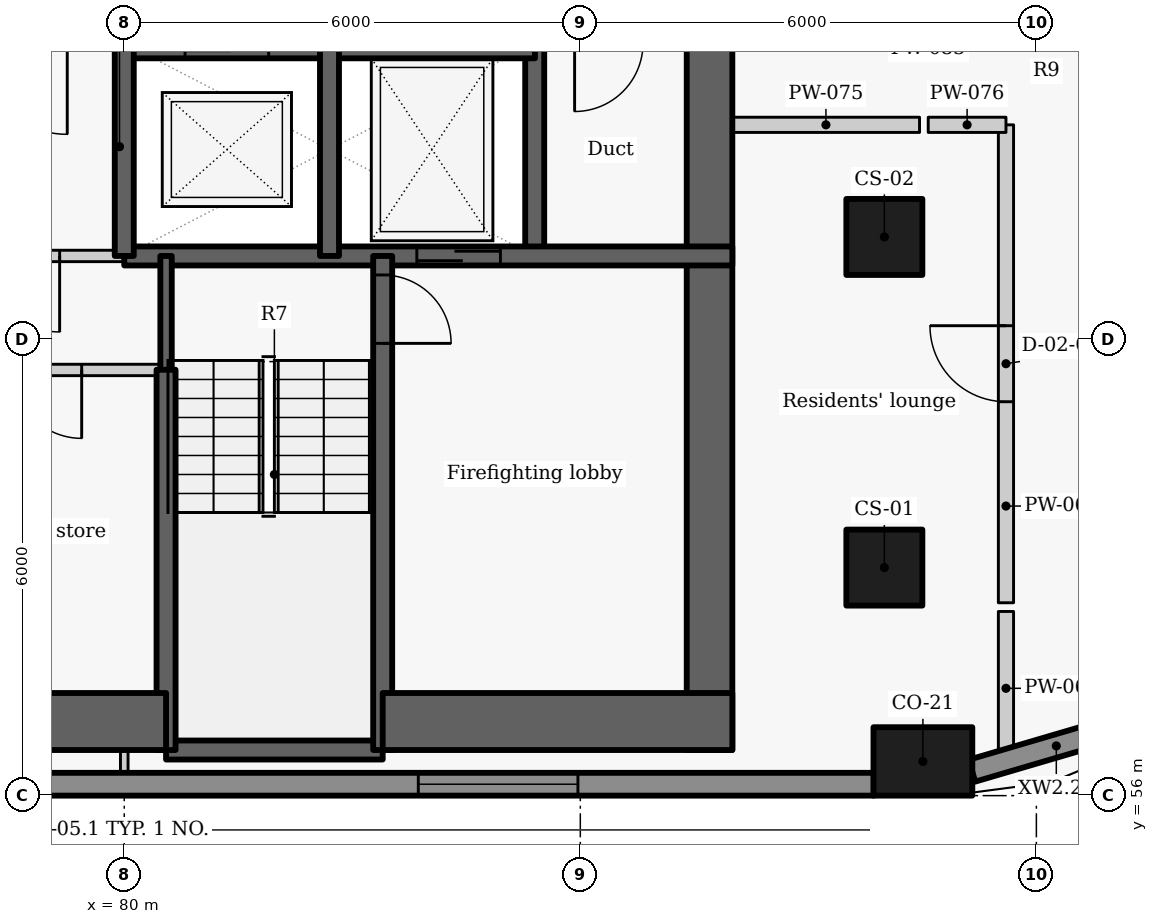
"""IFC4 building model, lengths in metres.
Left out: names, types, materials, properties, quantities, classifications, styles, units other than length and angle.
Written with IfcOpenShell. Run it as: python <this file> out.ifc"""

import sys

from ifc_helpers import new_model, si_unit, direction, frame, frame_2d, origin, origin_2d, place, context, subcontext, project, spatial, rectangle, extrude, element, fill, save


model = new_model("IFC4")
c1 = context("Model", 3, precision=1e-05, world=origin(), true_north=direction((0.0, 1.0)))
c2 = subcontext(c1, "Body", "Model", "MODEL_VIEW")
j1 = project(units=[si_unit("LENGTHUNIT", "METRE"), si_unit("PLANEANGLEUNIT", "RADIAN")], contexts=[c1])
p1 = place(None, origin())
s1 = spatial("IfcSite", under=j1, at=p1, CompositionType="ELEMENT")
p2 = place(p1, origin())
s2 = spatial("IfcBuilding", under=s1, at=p2, CompositionType="ELEMENT")
p3 = place(p2, frame((0.0, 0.0, 130.5)))
s3 = spatial("IfcBuildingStorey", under=s2, at=p3, CompositionType="ELEMENT", Elevation=130.5)
p4 = place(p3, frame((90.507, 56.45, 0.0), z_axis=(0.0, 0.0, 1.0), x_axis=(1.0, 0.0, 0.0)))
e1 = element("IfcColumn", 1, at=p4, inside=s3, PredefinedType="COLUMN", context=c2, shape_type="SweptSolid", body=[
    extrude(rectangle(XDim=1.3, YDim=0.9, at=origin_2d()), origin(), (0.0, 0.0, 1.0), 3.3),
])
for number, where, z_axis, x_axis in (
    (2, (90.0, 59.0, 0.0), (0.0, 0.0, 1.0), (0.0, 1.0, 0.0)),
    (3, (90.0, 63.35, 0.0), (0.0, 0.0, 1.0), (0.0, 1.0, 0.0)),
):
    element("IfcColumn", number, at=place(p3, frame(where, z_axis=z_axis, x_axis=x_axis)), inside=s3, PredefinedType="COLUMN", context=c2, shape_type="SweptSolid", body=[
        extrude(rectangle(XDim=1.0, YDim=1.0, at=origin_2d()), origin(), (0.0, 0.0, 1.0), 3.3),
    ])
p5 = place(p3, frame((69.821, 56.15, 0.0), z_axis=(0.0, 0.0, 1.0), x_axis=(1.0, 0.0, 0.0)))
e4 = element("IfcWall", 4, at=p5, inside=s3, PredefinedType="SOLIDWALL", context=c2, shape_type="SweptSolid", body=[
    extrude(rectangle(XDim=20.04, YDim=0.3, at=frame_2d((10.02, 0.0))), origin(), (0.0, 0.0, 1.0), 2.425),
])
p6 = place(p5, frame((4.051, 0.0, 0.9)))
e5 = element("IfcOpeningElement", 5, at=p6, cuts=e4, PredefinedType="OPENING", context=c2, shape_type="SweptSolid", body=[
    extrude(rectangle(XDim=2.1, YDim=1.1, at=frame_2d((1.05, 0.55))), frame((0.0, 0.16, 0.0), z_axis=(0.0, -1.0, 0.0), x_axis=(1.0, 0.0, 0.0)), (0.0, 0.0, 1.0), 0.32),
])
p7 = place(p5, frame((14.047, 0.0, 0.9)))
e6 = element("IfcOpeningElement", 6, at=p7, cuts=e4, PredefinedType="OPENING", context=c2, shape_type="SweptSolid", body=[
    extrude(rectangle(XDim=2.1, YDim=1.1, at=frame_2d((1.05, 0.55))), frame((0.0, 0.16, 0.0), z_axis=(0.0, -1.0, 0.0), x_axis=(1.0, 0.0, 0.0)), (0.0, 0.0, 1.0), 0.32),
])
p8 = place(p3, frame((91.153, 56.328, 0.0), z_axis=(0.0, 0.0, 1.0), x_axis=(0.959473072336, 0.281800325517, 0.0)))
e7 = element("IfcWall", 7, at=p8, inside=s3, PredefinedType="SOLIDWALL", context=c2, shape_type="SweptSolid", body=[
    extrude(rectangle(XDim=2.312, YDim=0.3, at=frame_2d((1.156, 0.0))), origin(), (0.0, 0.0, 1.0), 2.425),
])
p9 = place(p3, frame((85.4, 63.1, -0.275), z_axis=(0.0, 0.0, 1.0), x_axis=(0.0, 1.0, 0.0)))
e8 = element("IfcWall", 8, at=p9, inside=s3, PredefinedType="SHEAR", context=c2, shape_type="SweptSolid", body=[
    extrude(rectangle(XDim=2.8, YDim=0.25, at=frame_2d((1.4, 0.0))), origin(), (0.0, 0.0, 1.0), 3.3),
])
p10 = place(p3, frame((87.7, 72.2, -0.275), z_axis=(0.0, 0.0, 1.0), x_axis=(0.0, -1.0, 0.0)))
e9 = element("IfcWall", 9, at=p10, inside=s3, PredefinedType="SHEAR", context=c2, shape_type="SweptSolid", body=[
    extrude(rectangle(XDim=15.6, YDim=0.6, at=frame_2d((7.8, 0.0))), origin(), (0.0, 0.0, 1.0), 3.3),
])
p11 = place(p10, frame((3.852, 0.0, 0.275)))
e10 = element("IfcOpeningElement", 10, at=p11, cuts=e9, PredefinedType="OPENING", context=c2, shape_type="SweptSolid", body=[
    extrude(rectangle(XDim=1.5, YDim=2.1, at=frame_2d((0.75, 1.05))), frame((0.0, 0.31, 0.0), z_axis=(0.0, -1.0, 0.0), x_axis=(1.0, 0.0, 0.0)), (0.0, 0.0, 1.0), 0.62),
])
p12 = place(p3, frame((79.997, 65.9, -0.275), z_axis=(0.0, 0.0, 1.0), x_axis=(1.0, 0.0, 0.0)))
e11 = element("IfcWall", 11, at=p12, inside=s3, PredefinedType="SHEAR", context=c2, shape_type="SweptSolid", body=[
    extrude(rectangle(XDim=5.406, YDim=0.4, at=frame_2d((2.703, 0.0))), origin(), (0.0, 0.0, 1.0), 3.3),
])
p13 = place(p12, frame((0.803, 0.0, 0.275)))
e12 = element("IfcOpeningElement", 12, at=p13, cuts=e11, PredefinedType="OPENING", context=c2, shape_type="SweptSolid", body=[
    extrude(rectangle(XDim=1.1, YDim=2.1, at=frame_2d((0.55, 1.05))), frame((0.0, 0.21, 0.0), z_axis=(0.0, -1.0, 0.0), x_axis=(1.0, 0.0, 0.0)), (0.0, 0.0, 1.0), 0.42),
])
p14 = place(p3, frame((80.0, 63.1, -0.275), z_axis=(0.0, 0.0, 1.0), x_axis=(1.0, 0.0, 0.0)))
e13 = element("IfcWall", 13, at=p14, inside=s3, PredefinedType="SHEAR", context=c2, shape_type="SweptSolid", body=[
    extrude(rectangle(XDim=8.0, YDim=0.25, at=frame_2d((4.0, 0.0))), origin(), (0.0, 0.0, 1.0), 3.3),
])
p15 = place(p14, frame((3.849, 0.0, 0.275)))
e14 = element("IfcOpeningElement", 14, at=p15, cuts=e13, PredefinedType="OPENING", context=c2, shape_type="SweptSolid", body=[
    extrude(rectangle(XDim=1.1, YDim=2.1, at=frame_2d((0.55, 1.05))), frame((0.0, 0.135, 0.0), z_axis=(0.0, -1.0, 0.0), x_axis=(1.0, 0.0, 0.0)), (0.0, 0.0, 1.0), 0.27),
])
p16 = place(p3, frame((80.0, 63.1, -0.275), z_axis=(0.0, 0.0, 1.0), x_axis=(0.0, 1.0, 0.0)))
e15 = element("IfcWall", 15, at=p16, inside=s3, PredefinedType="SHEAR", context=c2, shape_type="SweptSolid", body=[
    extrude(rectangle(XDim=2.8, YDim=0.25, at=frame_2d((1.4, 0.0))), origin(), (0.0, 0.0, 1.0), 3.3),
])
p17 = place(p3, frame((80.0, 63.1, 0.0), z_axis=(0.0, 0.0, 1.0), x_axis=(-1.0, 0.0, 0.0)))
e16 = element("IfcWall", 16, at=p17, inside=s3, PredefinedType="PARTITIONING", context=c2, shape_type="SweptSolid", body=[
    extrude(rectangle(XDim=2.7, YDim=0.15, at=frame_2d((1.35, 0.0))), origin(), (0.0, 0.0, 1.0), 3.025),
])
p18 = place(p17, frame((0.85, 0.0, 0.0)))
e17 = element("IfcOpeningElement", 17, at=p18, cuts=e16, PredefinedType="OPENING", context=c2, shape_type="SweptSolid", body=[
    extrude(rectangle(XDim=1.0, YDim=2.1, at=frame_2d((0.5, 1.05))), frame((0.0, 0.085, 0.0), z_axis=(0.0, -1.0, 0.0), x_axis=(1.0, 0.0, 0.0)), (0.0, 0.0, 1.0), 0.17),
])
p19 = place(p3, frame((82.7, 63.1, -0.275), z_axis=(0.0, 0.0, 1.0), x_axis=(0.0, 1.0, 0.0)))
e18 = element("IfcWall", 18, at=p19, inside=s3, PredefinedType="SHEAR", context=c2, shape_type="SweptSolid", body=[
    extrude(rectangle(XDim=2.8, YDim=0.25, at=frame_2d((1.4, 0.0))), origin(), (0.0, 0.0, 1.0), 3.3),
])
p20 = place(p3, frame((80.55, 56.6, -0.275), z_axis=(0.0, 0.0, 1.0), x_axis=(1.0, 0.0, 0.0)))
e19 = element("IfcWall", 19, at=p20, inside=s3, PredefinedType="SHEAR", context=c2, shape_type="SweptSolid", body=[
    extrude(rectangle(XDim=2.85, YDim=0.25, at=frame_2d((1.425, 0.0))), origin(), (0.0, 0.0, 1.0), 3.3),
])
p21 = place(p3, frame((83.4, 63.1, -0.275), z_axis=(0.0, 0.0, 1.0), x_axis=(0.0, -1.0, 0.0)))
e20 = element("IfcWall", 20, at=p21, inside=s3, PredefinedType="SHEAR", context=c2, shape_type="SweptSolid", body=[
    extrude(rectangle(XDim=6.5, YDim=0.25, at=frame_2d((3.25, 0.0))), origin(), (0.0, 0.0, 1.0), 3.3),
])
p22 = place(p21, frame((0.25, 0.0, 0.275)))
e21 = element("IfcOpeningElement", 21, at=p22, cuts=e20, PredefinedType="OPENING", context=c2, shape_type="SweptSolid", body=[
    extrude(rectangle(XDim=0.9, YDim=2.1, at=frame_2d((0.45, 1.05))), frame((0.0, 0.135, 0.0), z_axis=(0.0, -1.0, 0.0), x_axis=(1.0, 0.0, 0.0)), (0.0, 0.0, 1.0), 0.27),
])
p23 = place(p3, frame((80.55, 61.597, -0.275), z_axis=(0.0, 0.0, 1.0), x_axis=(0.0, 1.0, 0.0)))
e22 = element("IfcWall", 22, at=p23, inside=s3, PredefinedType="SHEAR", context=c2, shape_type="SweptSolid", body=[
    extrude(rectangle(XDim=1.503, YDim=0.15, at=frame_2d((0.751, 0.0))), origin(), (0.0, 0.0, 1.0), 3.3),
])
p24 = place(p3, frame((80.55, 56.6, -0.275), z_axis=(0.0, 0.0, 1.0), x_axis=(0.0, 1.0, 0.0)))
e23 = element("IfcWall", 23, at=p24, inside=s3, PredefinedType="SHEAR", context=c2, shape_type="SweptSolid", body=[
    extrude(rectangle(XDim=5.003, YDim=0.25, at=frame_2d((2.501, 0.0))), origin(), (0.0, 0.0, 1.0), 3.3),
])
p25 = place(p3, frame((75.35, 56.975, -0.275), z_axis=(0.0, 0.0, 1.0), x_axis=(1.0, 0.0, 0.0)))
e24 = element("IfcWall", 24, at=p25, inside=s3, PredefinedType="SHEAR", context=c2, shape_type="SweptSolid", body=[
    extrude(rectangle(XDim=5.2, YDim=0.75, at=frame_2d((2.6, 0.0))), origin(), (0.0, 0.0, 1.0), 3.3),
])
p26 = place(p3, frame((83.4, 56.975, -0.275), z_axis=(0.0, 0.0, 1.0), x_axis=(1.0, 0.0, 0.0)))
e25 = element("IfcWall", 25, at=p26, inside=s3, PredefinedType="SHEAR", context=c2, shape_type="SweptSolid", body=[
    extrude(rectangle(XDim=4.6, YDim=0.75, at=frame_2d((2.3, 0.0))), origin(), (0.0, 0.0, 1.0), 3.3),
])
p27 = place(p3, frame((80.55, 61.6, 0.0), z_axis=(0.0, 0.0, 1.0), x_axis=(-1.0, 0.0, 0.0)))
e26 = element("IfcWall", 26, at=p27, inside=s3, PredefinedType="PARTITIONING", context=c2, shape_type="SweptSolid", body=[
    extrude(rectangle(XDim=5.2, YDim=0.15, at=frame_2d((2.6, 0.0))), origin(), (0.0, 0.0, 1.0), 3.025),
])
p28 = place(p27, frame((3.71, 0.0, 0.0)))
e27 = element("IfcOpeningElement", 27, at=p28, cuts=e26, PredefinedType="OPENING", context=c2, shape_type="SweptSolid", body=[
    extrude(rectangle(XDim=0.9, YDim=2.1, at=frame_2d((0.45, 1.05))), frame((0.0, 0.085, 0.0), z_axis=(0.0, -1.0, 0.0), x_axis=(1.0, 0.0, 0.0)), (0.0, 0.0, 1.0), 0.17),
])
p29 = place(p27, frame((1.11, 0.0, 0.0)))
e28 = element("IfcOpeningElement", 28, at=p29, cuts=e26, PredefinedType="OPENING", context=c2, shape_type="SweptSolid", body=[
    extrude(rectangle(XDim=0.9, YDim=2.1, at=frame_2d((0.45, 1.05))), frame((0.0, 0.085, 0.0), z_axis=(0.0, -1.0, 0.0), x_axis=(1.0, 0.0, 0.0)), (0.0, 0.0, 1.0), 0.17),
])
p30 = place(p3, frame((91.6, 56.401, 0.0), z_axis=(0.0, 0.0, 1.0), x_axis=(0.0, 1.0, 0.0)))
e29 = element("IfcWall", 29, at=p30, inside=s3, PredefinedType="PARTITIONING", context=c2, shape_type="SweptSolid", body=[
    extrude(rectangle(XDim=2.022, YDim=0.2, at=frame_2d((1.011, 0.0))), origin(), (0.0, 0.0, 1.0), 2.405),
])
p31 = place(p3, frame((91.6, 58.537, 0.0), z_axis=(0.0, 0.0, 1.0), x_axis=(0.0, 1.0, 0.0)))
e30 = element("IfcWall", 30, at=p31, inside=s3, PredefinedType="PARTITIONING", context=c2, shape_type="SweptSolid", body=[
    extrude(rectangle(XDim=6.288, YDim=0.2, at=frame_2d((3.144, 0.0))), origin(), (0.0, 0.0, 1.0), 3.025),
])
p32 = place(p31, frame((2.645, 0.0, 0.0)))
e31 = element("IfcOpeningElement", 31, at=p32, cuts=e30, PredefinedType="OPENING", context=c2, shape_type="SweptSolid", body=[
    extrude(rectangle(XDim=1.0, YDim=2.1, at=frame_2d((0.5, 1.05))), frame((0.0, 0.11, 0.0), z_axis=(0.0, -1.0, 0.0), x_axis=(1.0, 0.0, 0.0)), (0.0, 0.0, 1.0), 0.22),
])
p33 = place(p3, frame((88.0, 64.825, 0.0), z_axis=(0.0, 0.0, 1.0), x_axis=(1.0, 0.0, 0.0)))
e32 = element("IfcWall", 32, at=p33, inside=s3, PredefinedType="PARTITIONING", context=c2, shape_type="SweptSolid", body=[
    extrude(rectangle(XDim=2.463, YDim=0.2, at=frame_2d((1.231, 0.0))), origin(), (0.0, 0.0, 1.0), 2.505),
])
p34 = place(p3, frame((90.577, 64.825, 0.0), z_axis=(0.0, 0.0, 1.0), x_axis=(1.0, 0.0, 0.0)))
e33 = element("IfcWall", 33, at=p34, inside=s3, PredefinedType="PARTITIONING", context=c2, shape_type="SweptSolid", body=[
    extrude(rectangle(XDim=1.023, YDim=0.2, at=frame_2d((0.511, 0.0))), origin(), (0.0, 0.0, 1.0), 3.025),
])
p35 = place(p3, frame((80.0, 56.3, 0.0), z_axis=(0.0, 0.0, 1.0), x_axis=(0.0, 1.0, 0.0)))
e34 = element("IfcWall", 34, at=p35, inside=s3, PredefinedType="PARTITIONING", context=c2, shape_type="SweptSolid", body=[
    extrude(rectangle(XDim=0.3, YDim=0.1, at=frame_2d((0.15, 0.0))), origin(), (0.0, 0.0, 1.0), 3.025),
])
p36 = place(p7, origin())
e35 = element("IfcWindow", 35, at=p36, inside=s3, PartitioningType="SINGLE_PANEL", PredefinedType="WINDOW", context=c2, shape_type="SweptSolid", body=[
    extrude(rectangle(XDim=2.1, YDim=1.1, at=frame_2d((1.05, 0.55))), frame((0.0, 0.03, 0.0), z_axis=(0.0, -1.0, 0.0), x_axis=(1.0, 0.0, 0.0)), (0.0, 0.0, 1.0), 0.06),
])
fill(e6, e35)
p37 = place(p15, origin())
e36 = element("IfcDoor", 36, at=p37, inside=s3, OperationType="SLIDING_TO_LEFT", PredefinedType="DOOR", context=c2, shape_type="SweptSolid", body=[
    extrude(rectangle(XDim=1.1, YDim=2.1, at=frame_2d((0.55, 1.05))), frame((0.0, 0.025, 0.0), z_axis=(0.0, -1.0, 0.0), x_axis=(1.0, 0.0, 0.0)), (0.0, 0.0, 1.0), 0.05),
])
fill(e14, e36)
p38 = place(p18, origin())
e37 = element("IfcDoor", 37, at=p38, inside=s3, OperationType="SINGLE_SWING_LEFT", PredefinedType="DOOR", context=c2, shape_type="SweptSolid", body=[
    extrude(rectangle(XDim=1.0, YDim=2.1, at=frame_2d((0.5, 1.05))), frame((0.0, 0.025, 0.0), z_axis=(0.0, -1.0, 0.0), x_axis=(1.0, 0.0, 0.0)), (0.0, 0.0, 1.0), 0.05),
])
fill(e17, e37)
p39 = place(p29, origin())
e38 = element("IfcDoor", 38, at=p39, inside=s3, OperationType="SINGLE_SWING_LEFT", PredefinedType="DOOR", context=c2, shape_type="SweptSolid", body=[
    extrude(rectangle(XDim=0.9, YDim=2.1, at=frame_2d((0.45, 1.05))), frame((0.0, 0.025, 0.0), z_axis=(0.0, -1.0, 0.0), x_axis=(1.0, 0.0, 0.0)), (0.0, 0.0, 1.0), 0.05),
])
fill(e28, e38)
p40 = place(p22, origin())
e39 = element("IfcDoor", 39, at=p40, inside=s3, OperationType="SINGLE_SWING_RIGHT", PredefinedType="DOOR", context=c2, shape_type="SweptSolid", body=[
    extrude(rectangle(XDim=0.9, YDim=2.1, at=frame_2d((0.45, 1.05))), frame((0.0, 0.025, 0.0), z_axis=(0.0, -1.0, 0.0), x_axis=(1.0, 0.0, 0.0)), (0.0, 0.0, 1.0), 0.05),
])
fill(e21, e39)
p41 = place(p32, origin())
e40 = element("IfcDoor", 40, at=p41, inside=s3, OperationType="SINGLE_SWING_RIGHT", PredefinedType="DOOR", context=c2, shape_type="SweptSolid", body=[
    extrude(rectangle(XDim=1.0, YDim=2.1, at=frame_2d((0.5, 1.05))), frame((0.0, 0.025, 0.0), z_axis=(0.0, -1.0, 0.0), x_axis=(1.0, 0.0, 0.0)), (0.0, 0.0, 1.0), 0.05),
])
fill(e31, e40)
save(model, sys.argv[1])
